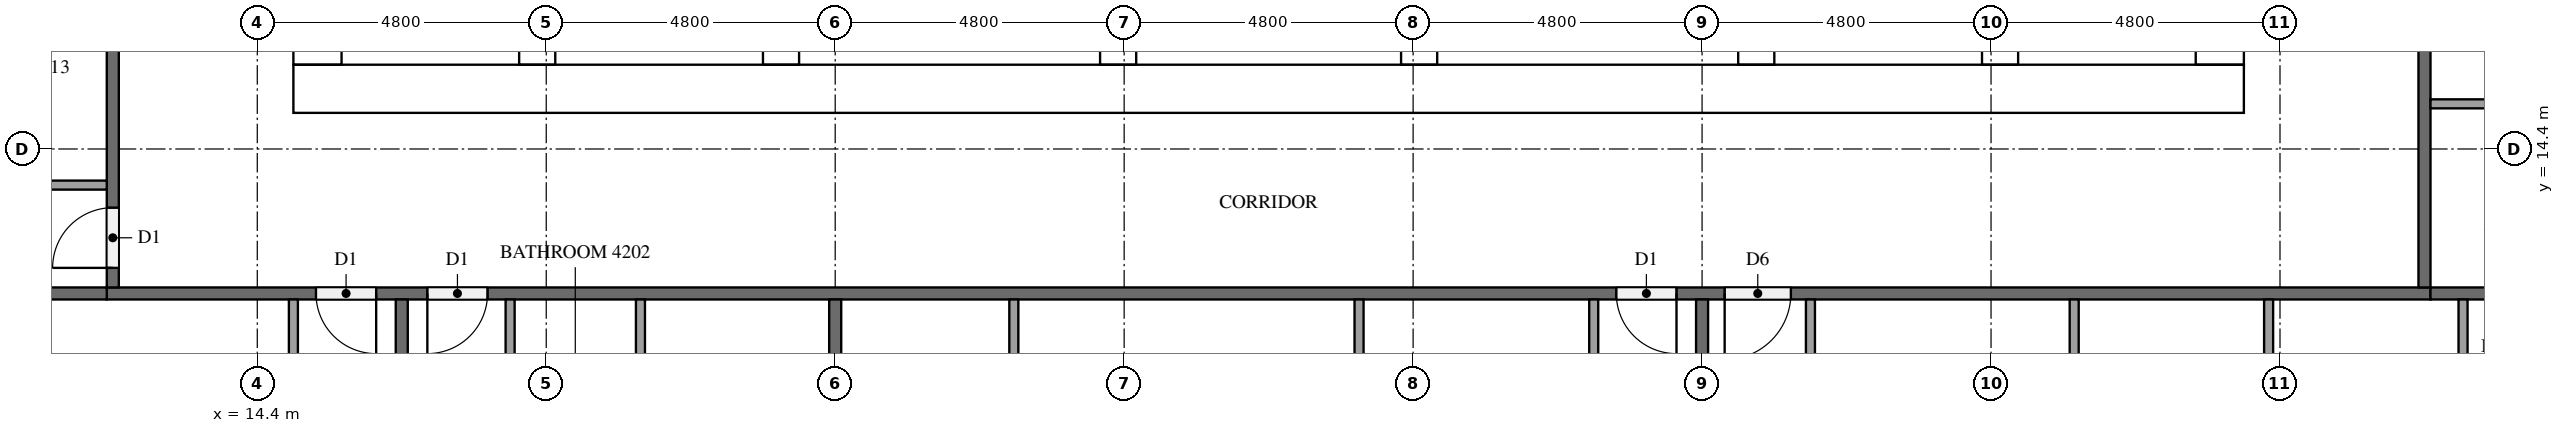
"""IFC4 building model, lengths in metres.
Left out: names, types, materials, properties, quantities, classifications, styles, units other than length and angle.
Written with IfcOpenShell. Run it as: python <this file> out.ifc"""

import sys

from ifc_helpers import new_model, si_unit, direction, frame, frame_2d, origin, place, context, subcontext, project, spatial, rectangle, extrude, element, fill, save


model = new_model("IFC4")
c1 = context("Model", 3, precision=1e-05, world=origin(), true_north=direction((0.0, 1.0)))
c2 = subcontext(c1, "Body", "Model", "MODEL_VIEW")
j1 = project(units=[si_unit("LENGTHUNIT", "METRE"), si_unit("PLANEANGLEUNIT", "RADIAN")], contexts=[c1])
p1 = place(None, origin())
s1 = spatial("IfcSite", under=j1, at=p1, CompositionType="ELEMENT")
p2 = place(p1, origin())
s2 = spatial("IfcBuilding", under=s1, at=p2, CompositionType="ELEMENT")
p3 = place(p2, frame((0.0, 0.0, 163.0)))
s3 = spatial("IfcBuildingStorey", under=s2, at=p3, CompositionType="ELEMENT", Elevation=163.0)
p4 = place(p3, frame((15.0, 15.4, 0.0), z_axis=(0.0, 0.0, 1.0), x_axis=(1.0, 0.0, 0.0)))
e1 = element("IfcWall", 1, at=p4, inside=s3, PredefinedType="SHEAR", context=c2, shape_type="SweptSolid", body=[
    extrude(rectangle(XDim=32.4, YDim=0.8, at=frame_2d((16.2, 0.0))), origin(), (0.0, 0.0, 1.0), 3.2),
])
p5 = place(p4, frame((15.3, 0.0, 0.0)))
e2 = element("IfcOpeningElement", 2, at=p5, cuts=e1, PredefinedType="OPENING", context=c2, shape_type="SweptSolid", body=[
    extrude(rectangle(XDim=1.8, YDim=2.1, at=frame_2d((0.9, 1.05))), frame((0.0, 0.41, 0.0), z_axis=(0.0, -1.0, 0.0), x_axis=(1.0, 0.0, 0.0)), (0.0, 0.0, 1.0), 0.82),
])
p6 = place(p3, frame((15.4, 15.8, 0.0), z_axis=(0.0, 0.0, 1.0), x_axis=(0.0, 1.0, 0.0)))
e3 = element("IfcWall", 3, at=p6, inside=s3, PredefinedType="SHEAR", context=c2, shape_type="SweptSolid", body=[
    extrude(rectangle(XDim=21.2, YDim=0.8, at=frame_2d((10.6, 0.0))), origin(), (0.0, 0.0, 1.0), 3.2),
])
p7 = place(p6, frame((4.96, 0.0, 0.0)))
e4 = element("IfcOpeningElement", 4, at=p7, cuts=e3, PredefinedType="OPENING", context=c2, shape_type="SweptSolid", body=[
    extrude(rectangle(XDim=1.2, YDim=2.1, at=frame_2d((0.6, 1.05))), frame((0.0, 0.41, 0.0), z_axis=(0.0, -1.0, 0.0), x_axis=(1.0, 0.0, 0.0)), (0.0, 0.0, 1.0), 0.82),
])
p8 = place(p3, frame((47.0, 15.8, 0.0), z_axis=(0.0, 0.0, 1.0), x_axis=(0.0, 1.0, 0.0)))
e5 = element("IfcWall", 5, at=p8, inside=s3, PredefinedType="SHEAR", context=c2, shape_type="SweptSolid", body=[
    extrude(rectangle(XDim=21.2, YDim=0.8, at=frame_2d((10.6, 0.0))), origin(), (0.0, 0.0, 1.0), 3.2),
])
p9 = place(p8, frame((10.3, 0.0, 0.0)))
e6 = element("IfcOpeningElement", 6, at=p9, cuts=e5, PredefinedType="OPENING", context=c2, shape_type="SweptSolid", body=[
    extrude(rectangle(XDim=1.2, YDim=2.1, at=frame_2d((0.6, 1.05))), frame((0.0, 0.41, 0.0), z_axis=(0.0, -1.0, 0.0), x_axis=(1.0, 0.0, 0.0)), (0.0, 0.0, 1.0), 0.82),
])
p10 = place(p3, frame((19.05, 15.8, 0.0), z_axis=(0.0, 0.0, 1.0), x_axis=(0.0, 1.0, 0.0)))
e7 = element("IfcWall", 7, at=p10, inside=s3, PredefinedType="SHEAR", context=c2, shape_type="SweptSolid", body=[
    extrude(rectangle(XDim=15.15, YDim=0.6, at=frame_2d((7.575, 0.0))), origin(), (0.0, 0.0, 1.0), 3.2),
])
p11 = place(p10, frame((9.65, 0.0, 0.0)))
e8 = element("IfcOpeningElement", 8, at=p11, cuts=e7, PredefinedType="OPENING", context=c2, shape_type="SweptSolid", body=[
    extrude(rectangle(XDim=1.1, YDim=2.1, at=frame_2d((0.55, 1.05))), frame((0.0, 0.31, 0.0), z_axis=(0.0, -1.0, 0.0), x_axis=(1.0, 0.0, 0.0)), (0.0, 0.0, 1.0), 0.62),
])
p12 = place(p10, frame((13.15, 0.0, 0.0)))
e9 = element("IfcOpeningElement", 9, at=p12, cuts=e7, PredefinedType="OPENING", context=c2, shape_type="SweptSolid", body=[
    extrude(rectangle(XDim=1.1, YDim=2.1, at=frame_2d((0.55, 1.05))), frame((0.0, 0.31, 0.0), z_axis=(0.0, -1.0, 0.0), x_axis=(1.0, 0.0, 0.0)), (0.0, 0.0, 1.0), 0.62),
])
p13 = place(p10, frame((0.4, 0.0, 0.0)))
e10 = element("IfcOpeningElement", 10, at=p13, cuts=e7, PredefinedType="OPENING", context=c2, shape_type="SweptSolid", body=[
    extrude(rectangle(XDim=1.2, YDim=2.1, at=frame_2d((0.6, 1.05))), frame((0.0, 0.31, 0.0), z_axis=(0.0, -1.0, 0.0), x_axis=(1.0, 0.0, 0.0)), (0.0, 0.0, 1.0), 0.62),
])
p14 = place(p3, frame((23.1, 15.8, 0.0), z_axis=(0.0, 0.0, 1.0), x_axis=(0.0, 1.0, 0.0)))
e11 = element("IfcWall", 11, at=p14, inside=s3, PredefinedType="SHEAR", context=c2, shape_type="SweptSolid", body=[
    extrude(rectangle(XDim=21.2, YDim=0.6, at=frame_2d((10.6, 0.0))), origin(), (0.0, 0.0, 1.0), 3.2),
])
p15 = place(p3, frame((39.3, 15.8, 0.0), z_axis=(0.0, 0.0, 1.0), x_axis=(0.0, 1.0, 0.0)))
e12 = element("IfcWall", 12, at=p15, inside=s3, PredefinedType="SHEAR", context=c2, shape_type="SweptSolid", body=[
    extrude(rectangle(XDim=8.45, YDim=0.6, at=frame_2d((4.225, 0.0))), origin(), (0.0, 0.0, 1.0), 3.2),
])
p16 = place(p3, frame((43.35, 15.8, 0.0), z_axis=(0.0, 0.0, 1.0), x_axis=(0.0, 1.0, 0.0)))
e13 = element("IfcWall", 13, at=p16, inside=s3, PredefinedType="SHEAR", context=c2, shape_type="SweptSolid", body=[
    extrude(rectangle(XDim=8.45, YDim=0.6, at=frame_2d((4.225, 0.0))), origin(), (0.0, 0.0, 1.0), 3.2),
])
p17 = place(p16, frame((0.4, 0.0, 0.0)))
e14 = element("IfcOpeningElement", 14, at=p17, cuts=e13, PredefinedType="OPENING", context=c2, shape_type="SweptSolid", body=[
    extrude(rectangle(XDim=1.2, YDim=2.1, at=frame_2d((0.6, 1.05))), frame((0.0, 0.31, 0.0), z_axis=(0.0, -1.0, 0.0), x_axis=(1.0, 0.0, 0.0)), (0.0, 0.0, 1.0), 0.62),
])
for number, where, z_axis, x_axis in (
    (15, (28.7, 15.8, 0.0), (0.0, 0.0, 1.0), (0.0, 1.0, 0.0)),
    (16, (33.7, 15.8, 0.0), (0.0, 0.0, 1.0), (0.0, 1.0, 0.0)),
):
    element("IfcWall", number, at=place(p3, frame(where, z_axis=z_axis, x_axis=x_axis)), inside=s3, PredefinedType="SHEAR", context=c2, shape_type="SweptSolid", body=[
        extrude(rectangle(XDim=2.65, YDim=0.6, at=frame_2d((1.325, 0.0))), origin(), (0.0, 0.0, 1.0), 3.2),
    ])
p18 = place(p3, frame((50.5, 12.0, 0.0), z_axis=(0.0, 0.0, 1.0), x_axis=(-1.0, 0.0, 0.0)))
e17 = element("IfcWall", 17, at=p18, inside=s3, PredefinedType="PARTITIONING", context=c2, shape_type="SweptSolid", body=[
    extrude(rectangle(XDim=38.6, YDim=0.2, at=frame_2d((19.3, 0.0))), origin(), (0.0, 0.0, 1.0), 3.2),
])
p19 = place(p18, frame((34.125, 0.0, 0.0)))
e18 = element("IfcOpeningElement", 18, at=p19, cuts=e17, PredefinedType="OPENING", context=c2, shape_type="SweptSolid", body=[
    extrude(rectangle(XDim=1.0, YDim=2.1, at=frame_2d((0.5, 1.05))), frame((0.0, 0.11, 0.0), z_axis=(0.0, -1.0, 0.0), x_axis=(1.0, 0.0, 0.0)), (0.0, 0.0, 1.0), 0.22),
])
p20 = place(p18, frame((32.275, 0.0, 0.0)))
e19 = element("IfcOpeningElement", 19, at=p20, cuts=e17, PredefinedType="OPENING", context=c2, shape_type="SweptSolid", body=[
    extrude(rectangle(XDim=1.0, YDim=2.1, at=frame_2d((0.5, 1.05))), frame((0.0, 0.11, 0.0), z_axis=(0.0, -1.0, 0.0), x_axis=(1.0, 0.0, 0.0)), (0.0, 0.0, 1.0), 0.22),
])
p21 = place(p18, frame((12.525, 0.0, 0.0)))
e20 = element("IfcOpeningElement", 20, at=p21, cuts=e17, PredefinedType="OPENING", context=c2, shape_type="SweptSolid", body=[
    extrude(rectangle(XDim=1.0, YDim=2.1, at=frame_2d((0.5, 1.05))), frame((0.0, 0.11, 0.0), z_axis=(0.0, -1.0, 0.0), x_axis=(1.0, 0.0, 0.0)), (0.0, 0.0, 1.0), 0.22),
])
p22 = place(p18, frame((10.625, 0.0, 0.0)))
e21 = element("IfcOpeningElement", 21, at=p22, cuts=e17, PredefinedType="OPENING", context=c2, shape_type="SweptSolid", body=[
    extrude(rectangle(XDim=1.1, YDim=2.1, at=frame_2d((0.55, 1.05))), frame((0.0, 0.11, 0.0), z_axis=(0.0, -1.0, 0.0), x_axis=(1.0, 0.0, 0.0)), (0.0, 0.0, 1.0), 0.22),
])
p23 = place(p3, frame((50.4, 40.7, 0.0), z_axis=(0.0, 0.0, 1.0), x_axis=(0.0, -1.0, 0.0)))
e22 = element("IfcWall", 22, at=p23, inside=s3, PredefinedType="PARTITIONING", context=c2, shape_type="SweptSolid", body=[
    extrude(rectangle(XDim=28.6, YDim=0.2, at=frame_2d((14.3, 0.0))), origin(), (0.0, 0.0, 1.0), 3.2),
])
p24 = place(p23, frame((19.525, 0.0, 0.0)))
e23 = element("IfcOpeningElement", 23, at=p24, cuts=e22, PredefinedType="OPENING", context=c2, shape_type="SweptSolid", body=[
    extrude(rectangle(XDim=1.0, YDim=2.1, at=frame_2d((0.5, 1.05))), frame((0.0, 0.11, 0.0), z_axis=(0.0, -1.0, 0.0), x_axis=(1.0, 0.0, 0.0)), (0.0, 0.0, 1.0), 0.22),
])
p25 = place(p23, frame((17.675, 0.0, 0.0)))
e24 = element("IfcOpeningElement", 24, at=p25, cuts=e22, PredefinedType="OPENING", context=c2, shape_type="SweptSolid", body=[
    extrude(rectangle(XDim=1.0, YDim=2.1, at=frame_2d((0.5, 1.05))), frame((0.0, 0.11, 0.0), z_axis=(0.0, -1.0, 0.0), x_axis=(1.0, 0.0, 0.0)), (0.0, 0.0, 1.0), 0.22),
])
p26 = place(p23, frame((8.075, 0.0, 0.0)))
e25 = element("IfcOpeningElement", 25, at=p26, cuts=e22, PredefinedType="OPENING", context=c2, shape_type="SweptSolid", body=[
    extrude(rectangle(XDim=1.0, YDim=2.1, at=frame_2d((0.5, 1.05))), frame((0.0, 0.11, 0.0), z_axis=(0.0, -1.0, 0.0), x_axis=(1.0, 0.0, 0.0)), (0.0, 0.0, 1.0), 0.22),
])
p27 = place(p3, frame((12.0, 12.1, 0.0), z_axis=(0.0, 0.0, 1.0), x_axis=(0.0, 1.0, 0.0)))
e26 = element("IfcWall", 26, at=p27, inside=s3, PredefinedType="PARTITIONING", context=c2, shape_type="SweptSolid", body=[
    extrude(rectangle(XDim=28.6, YDim=0.2, at=frame_2d((14.3, 0.0))), origin(), (0.0, 0.0, 1.0), 3.2),
])
p28 = place(p27, frame((24.325, 0.0, 0.0)))
e27 = element("IfcOpeningElement", 27, at=p28, cuts=e26, PredefinedType="OPENING", context=c2, shape_type="SweptSolid", body=[
    extrude(rectangle(XDim=1.0, YDim=2.1, at=frame_2d((0.5, 1.05))), frame((0.0, 0.11, 0.0), z_axis=(0.0, -1.0, 0.0), x_axis=(1.0, 0.0, 0.0)), (0.0, 0.0, 1.0), 0.22),
])
p29 = place(p27, frame((22.475, 0.0, 0.0)))
e28 = element("IfcOpeningElement", 28, at=p29, cuts=e26, PredefinedType="OPENING", context=c2, shape_type="SweptSolid", body=[
    extrude(rectangle(XDim=1.0, YDim=2.1, at=frame_2d((0.5, 1.05))), frame((0.0, 0.11, 0.0), z_axis=(0.0, -1.0, 0.0), x_axis=(1.0, 0.0, 0.0)), (0.0, 0.0, 1.0), 0.22),
])
p30 = place(p27, frame((0.325, 0.0, 0.0)))
e29 = element("IfcOpeningElement", 29, at=p30, cuts=e26, PredefinedType="OPENING", context=c2, shape_type="SweptSolid", body=[
    extrude(rectangle(XDim=1.0, YDim=2.1, at=frame_2d((0.5, 1.05))), frame((0.0, 0.11, 0.0), z_axis=(0.0, -1.0, 0.0), x_axis=(1.0, 0.0, 0.0)), (0.0, 0.0, 1.0), 0.22),
])
for number, where, z_axis, x_axis in (
    (30, (16.8, 11.9, 0.0), (0.0, 0.0, 1.0), (0.0, -1.0, 0.0)),
    (31, (0.1, 12.0, 0.0), (0.0, 0.0, 1.0), (1.0, 0.0, 0.0)),
):
    element("IfcWall", number, at=place(p3, frame(where, z_axis=z_axis, x_axis=x_axis)), inside=s3, PredefinedType="PARTITIONING", context=c2, shape_type="SweptSolid", body=[
        extrude(rectangle(XDim=11.8, YDim=0.2, at=frame_2d((5.9, 0.0))), origin(), (0.0, 0.0, 1.0), 3.2),
    ])
p31 = place(p3, frame((24.0, 11.9, 0.0), z_axis=(0.0, 0.0, 1.0), x_axis=(0.0, -1.0, 0.0)))
e32 = element("IfcWall", 32, at=p31, inside=s3, PredefinedType="PARTITIONING", context=c2, shape_type="SweptSolid", body=[
    extrude(rectangle(XDim=11.525, YDim=0.2, at=frame_2d((5.762, 0.0))), origin(), (0.0, 0.0, 1.0), 3.2),
])
p32 = place(p3, frame((38.4, 11.9, 0.0), z_axis=(0.0, 0.0, 1.0), x_axis=(0.0, -1.0, 0.0)))
e33 = element("IfcWall", 33, at=p32, inside=s3, PredefinedType="PARTITIONING", context=c2, shape_type="SweptSolid", body=[
    extrude(rectangle(XDim=11.8, YDim=0.2, at=frame_2d((5.9, 0.0))), origin(), (0.0, 0.0, 1.0), 3.2),
])
p33 = place(p3, frame((50.5, 12.0, 0.0), z_axis=(0.0, 0.0, 1.0), x_axis=(1.0, 0.0, 0.0)))
e34 = element("IfcWall", 34, at=p33, inside=s3, PredefinedType="PARTITIONING", context=c2, shape_type="SweptSolid", body=[
    extrude(rectangle(XDim=7.0, YDim=0.2, at=frame_2d((3.5, 0.0))), origin(), (0.0, 0.0, 1.0), 3.2),
])
p34 = place(p3, frame((15.0, 11.9, 0.0), z_axis=(0.0, 0.0, 1.0), x_axis=(0.0, -1.0, 0.0)))
e35 = element("IfcWall", 35, at=p34, inside=s3, PredefinedType="PARTITIONING", context=c2, shape_type="SweptSolid", body=[
    extrude(rectangle(XDim=3.125, YDim=0.15, at=frame_2d((1.562, 0.0))), origin(), (0.0, 0.0, 1.0), 3.2),
])
p35 = place(p3, frame((20.765, 11.9, 0.0), z_axis=(0.0, 0.0, 1.0), x_axis=(0.0, -1.0, 0.0)))
e36 = element("IfcWall", 36, at=p35, inside=s3, PredefinedType="PARTITIONING", context=c2, shape_type="SweptSolid", body=[
    extrude(rectangle(XDim=2.975, YDim=0.15, at=frame_2d((1.487, 0.0))), origin(), (0.0, 0.0, 1.0), 3.2),
])
for number, where, z_axis, x_axis in (
    (37, (18.6, 11.9, 0.0), (0.0, 0.0, 1.0), (0.0, -1.0, 0.0)),
    (38, (32.702, 11.9, 0.0), (0.0, 0.0, 1.0), (0.0, -1.0, 0.0)),
    (39, (26.967, 11.9, 0.0), (0.0, 0.0, 1.0), (0.0, -1.0, 0.0)),
):
    element("IfcWall", number, at=place(p3, frame(where, z_axis=z_axis, x_axis=x_axis)), inside=s3, PredefinedType="PARTITIONING", context=c2, shape_type="SweptSolid", body=[
        extrude(rectangle(XDim=3.125, YDim=0.15, at=frame_2d((1.562, 0.0))), origin(), (0.0, 0.0, 1.0), 3.2),
    ])
p36 = place(p3, frame((36.6, 11.9, 0.0), z_axis=(0.0, 0.0, 1.0), x_axis=(0.0, -1.0, 0.0)))
e40 = element("IfcWall", 40, at=p36, inside=s3, PredefinedType="PARTITIONING", context=c2, shape_type="SweptSolid", body=[
    extrude(rectangle(XDim=3.275, YDim=0.15, at=frame_2d((1.637, 0.0))), origin(), (0.0, 0.0, 1.0), 3.2),
])
for number, where, z_axis, x_axis in (
    (41, (44.581, 11.9, 0.0), (0.0, 0.0, 1.0), (0.0, -1.0, 0.0)),
    (42, (47.811, 11.9, 0.0), (0.0, 0.0, 1.0), (0.0, -1.0, 0.0)),
    (43, (51.041, 11.9, 0.0), (0.0, 0.0, 1.0), (0.0, -1.0, 0.0)),
):
    element("IfcWall", number, at=place(p3, frame(where, z_axis=z_axis, x_axis=x_axis)), inside=s3, PredefinedType="PARTITIONING", context=c2, shape_type="SweptSolid", body=[
        extrude(rectangle(XDim=4.175, YDim=0.15, at=frame_2d((2.087, 0.0))), origin(), (0.0, 0.0, 1.0), 3.2),
    ])
p37 = place(p3, frame((40.2, 11.9, 0.0), z_axis=(0.0, 0.0, 1.0), x_axis=(0.0, -1.0, 0.0)))
e44 = element("IfcWall", 44, at=p37, inside=s3, PredefinedType="PARTITIONING", context=c2, shape_type="SweptSolid", body=[
    extrude(rectangle(XDim=4.325, YDim=0.15, at=frame_2d((2.163, 0.0))), origin(), (0.0, 0.0, 1.0), 3.2),
])
p38 = place(p3, frame((50.5, 15.15, 0.0), z_axis=(0.0, 0.0, 1.0), x_axis=(1.0, 0.0, 0.0)))
e45 = element("IfcWall", 45, at=p38, inside=s3, PredefinedType="PARTITIONING", context=c2, shape_type="SweptSolid", body=[
    extrude(rectangle(XDim=1.925, YDim=0.15, at=frame_2d((0.962, 0.0))), origin(), (0.0, 0.0, 1.0), 3.2),
])
p39 = place(p3, frame((11.9, 13.8, 0.0), z_axis=(0.0, 0.0, 1.0), x_axis=(-1.0, 0.0, 0.0)))
e46 = element("IfcWall", 46, at=p39, inside=s3, PredefinedType="PARTITIONING", context=c2, shape_type="SweptSolid", body=[
    extrude(rectangle(XDim=3.875, YDim=0.15, at=frame_2d((1.938, 0.0))), origin(), (0.0, 0.0, 1.0), 3.2),
])
p40 = place(p5, frame((1.8, 0.0, 0.0), z_axis=(0.0, 0.0, 1.0), x_axis=(-1.0, 0.0, 0.0)))
e47 = element("IfcDoor", 47, at=p40, inside=s3, OperationType="DOUBLE_DOOR_SINGLE_SWING", PredefinedType="DOOR", context=c2, shape_type="SweptSolid", body=[
    extrude(rectangle(XDim=1.8, YDim=2.1, at=frame_2d((0.9, 1.05))), frame((0.0, 0.025, 0.0), z_axis=(0.0, -1.0, 0.0), x_axis=(1.0, 0.0, 0.0)), (0.0, 0.0, 1.0), 0.05),
])
fill(e2, e47)
p41 = place(p19, origin())
e48 = element("IfcDoor", 48, at=p41, inside=s3, OperationType="SINGLE_SWING_LEFT", PredefinedType="DOOR", context=c2, shape_type="SweptSolid", body=[
    extrude(rectangle(XDim=1.0, YDim=2.1, at=frame_2d((0.5, 1.05))), frame((0.0, 0.025, 0.0), z_axis=(0.0, -1.0, 0.0), x_axis=(1.0, 0.0, 0.0)), (0.0, 0.0, 1.0), 0.05),
])
fill(e18, e48)
p42 = place(p20, origin())
e49 = element("IfcDoor", 49, at=p42, inside=s3, OperationType="SINGLE_SWING_RIGHT", PredefinedType="DOOR", context=c2, shape_type="SweptSolid", body=[
    extrude(rectangle(XDim=1.0, YDim=2.1, at=frame_2d((0.5, 1.05))), frame((0.0, 0.025, 0.0), z_axis=(0.0, -1.0, 0.0), x_axis=(1.0, 0.0, 0.0)), (0.0, 0.0, 1.0), 0.05),
])
fill(e19, e49)
p43 = place(p21, origin())
e50 = element("IfcDoor", 50, at=p43, inside=s3, OperationType="SINGLE_SWING_LEFT", PredefinedType="DOOR", context=c2, shape_type="SweptSolid", body=[
    extrude(rectangle(XDim=1.0, YDim=2.1, at=frame_2d((0.5, 1.05))), frame((0.0, 0.025, 0.0), z_axis=(0.0, -1.0, 0.0), x_axis=(1.0, 0.0, 0.0)), (0.0, 0.0, 1.0), 0.05),
])
fill(e20, e50)
p44 = place(p22, origin())
e51 = element("IfcDoor", 51, at=p44, inside=s3, OperationType="SINGLE_SWING_RIGHT", PredefinedType="DOOR", context=c2, shape_type="SweptSolid", body=[
    extrude(rectangle(XDim=1.1, YDim=2.1, at=frame_2d((0.55, 1.05))), frame((0.0, 0.025, 0.0), z_axis=(0.0, -1.0, 0.0), x_axis=(1.0, 0.0, 0.0)), (0.0, 0.0, 1.0), 0.05),
])
fill(e21, e51)
p45 = place(p30, origin())
e52 = element("IfcDoor", 52, at=p45, inside=s3, OperationType="SINGLE_SWING_LEFT", PredefinedType="DOOR", context=c2, shape_type="SweptSolid", body=[
    extrude(rectangle(XDim=1.0, YDim=2.1, at=frame_2d((0.5, 1.05))), frame((0.0, 0.025, 0.0), z_axis=(0.0, -1.0, 0.0), x_axis=(1.0, 0.0, 0.0)), (0.0, 0.0, 1.0), 0.05),
])
fill(e29, e52)
save(model, sys.argv[1])
